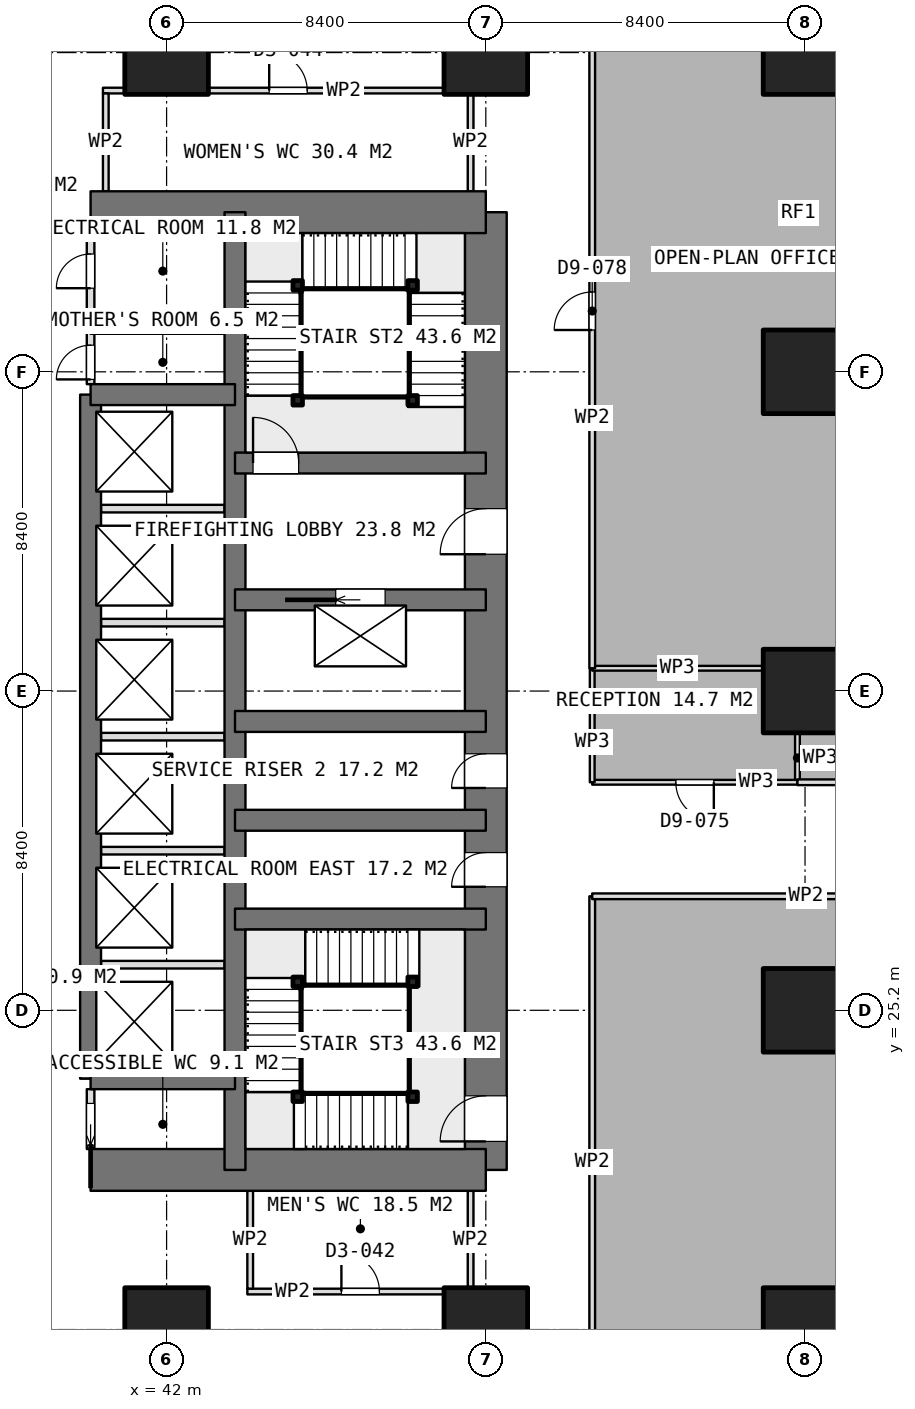
"""IFC4 building model, lengths in metres.
Left out: names, types, materials, properties, quantities, classifications, styles, units other than length and angle.
Written with IfcOpenShell. Run it as: python <this file> out.ifc"""

import sys

from ifc_helpers import new_model, si_unit, direction, frame, frame_2d, origin, origin_2d, place, context, subcontext, project, spatial, rectangle, extrude, element, fill, save


model = new_model("IFC4")
c1 = context("Model", 3, precision=1e-05, world=origin(), true_north=direction((0.0, 1.0)))
c2 = subcontext(c1, "Body", "Model", "MODEL_VIEW")
j1 = project(units=[si_unit("LENGTHUNIT", "METRE"), si_unit("PLANEANGLEUNIT", "RADIAN")], contexts=[c1])
p1 = place(None, origin())
s1 = spatial("IfcSite", under=j1, at=p1, CompositionType="ELEMENT")
p2 = place(p1, origin())
s2 = spatial("IfcBuilding", under=s1, at=p2, CompositionType="ELEMENT")
p3 = place(p2, frame((0.0, 0.0, 36.65)))
s3 = spatial("IfcBuildingStorey", under=s2, at=p3, CompositionType="ELEMENT", Elevation=36.65)
for number, where, z_axis, x_axis in (
    (1, (40.0, 21.0, 0.0), (0.0, 0.0, 1.0), (1.0, 0.0, 0.0)),
    (2, (40.0, 46.2, 0.0), (0.0, 0.0, 1.0), (1.0, 0.0, 0.0)),
):
    element("IfcWall", number, at=place(p3, frame(where, z_axis=z_axis, x_axis=x_axis)), inside=s3, PredefinedType="SHEAR", context=c2, shape_type="SweptSolid", body=[
        extrude(rectangle(XDim=10.4, YDim=1.1, at=frame_2d((5.2, 0.0))), origin(), (0.0, 0.0, 1.0), 3.75),
    ])
p4 = place(p3, frame((50.4, 21.0, 0.0), z_axis=(0.0, 0.0, 1.0), x_axis=(0.0, 1.0, 0.0)))
e3 = element("IfcWall", 3, at=p4, inside=s3, PredefinedType="SHEAR", context=c2, shape_type="SweptSolid", body=[
    extrude(rectangle(XDim=25.2, YDim=1.1, at=frame_2d((12.6, 0.0))), origin(), (0.0, 0.0, 1.0), 3.75),
])
p5 = place(p4, frame((16.2, 0.0, 0.0)))
e4 = element("IfcOpeningElement", 4, at=p5, cuts=e3, PredefinedType="OPENING", context=c2, shape_type="SweptSolid", body=[
    extrude(rectangle(XDim=1.2, YDim=2.1, at=frame_2d((0.6, 1.05))), frame((0.0, 0.56, 0.0), z_axis=(0.0, -1.0, 0.0), x_axis=(1.0, 0.0, 0.0)), (0.0, 0.0, 1.0), 1.12),
])
p6 = place(p4, frame((10.05, 0.0, 0.0)))
e5 = element("IfcOpeningElement", 5, at=p6, cuts=e3, PredefinedType="OPENING", context=c2, shape_type="SweptSolid", body=[
    extrude(rectangle(XDim=0.9, YDim=2.1, at=frame_2d((0.45, 1.05))), frame((0.0, 0.56, 0.0), z_axis=(0.0, -1.0, 0.0), x_axis=(1.0, 0.0, 0.0)), (0.0, 0.0, 1.0), 1.12),
])
p7 = place(p4, frame((7.45, 0.0, 0.0)))
e6 = element("IfcOpeningElement", 6, at=p7, cuts=e3, PredefinedType="OPENING", context=c2, shape_type="SweptSolid", body=[
    extrude(rectangle(XDim=0.9, YDim=2.1, at=frame_2d((0.45, 1.05))), frame((0.0, 0.56, 0.0), z_axis=(0.0, -1.0, 0.0), x_axis=(1.0, 0.0, 0.0)), (0.0, 0.0, 1.0), 1.12),
])
p8 = place(p4, frame((0.75, 0.0, 0.0)))
e7 = element("IfcOpeningElement", 7, at=p8, cuts=e3, PredefinedType="OPENING", context=c2, shape_type="SweptSolid", body=[
    extrude(rectangle(XDim=1.2, YDim=2.1, at=frame_2d((0.6, 1.05))), frame((0.0, 0.56, 0.0), z_axis=(0.0, -1.0, 0.0), x_axis=(1.0, 0.0, 0.0)), (0.0, 0.0, 1.0), 1.12),
])
p9 = place(p3, frame((43.8, 21.0, 0.0), z_axis=(0.0, 0.0, 1.0), x_axis=(0.0, 1.0, 0.0)))
e8 = element("IfcWall", 8, at=p9, inside=s3, PredefinedType="SHEAR", context=c2, shape_type="SweptSolid", body=[
    extrude(rectangle(XDim=25.2, YDim=0.55, at=frame_2d((12.6, 0.0))), origin(), (0.0, 0.0, 1.0), 3.75),
])
p10 = place(p3, frame((40.0, 23.4, 0.0), z_axis=(0.0, 0.0, 1.0), x_axis=(0.0, 1.0, 0.0)))
e9 = element("IfcWall", 9, at=p10, inside=s3, PredefinedType="SHEAR", context=c2, shape_type="SweptSolid", body=[
    extrude(rectangle(XDim=18.0, YDim=0.55, at=frame_2d((9.0, 0.0))), origin(), (0.0, 0.0, 1.0), 3.75),
])
for number, where, z_axis, x_axis in (
    (10, (40.0, 23.4, 0.0), (0.0, 0.0, 1.0), (1.0, 0.0, 0.0)),
    (11, (40.0, 41.4, 0.0), (0.0, 0.0, 1.0), (1.0, 0.0, 0.0)),
):
    element("IfcWall", number, at=place(p3, frame(where, z_axis=z_axis, x_axis=x_axis)), inside=s3, PredefinedType="SHEAR", context=c2, shape_type="SweptSolid", body=[
        extrude(rectangle(XDim=3.8, YDim=0.55, at=frame_2d((1.9, 0.0))), origin(), (0.0, 0.0, 1.0), 3.75),
    ])
for number, where, z_axis, x_axis in (
    (12, (43.8, 27.6, 0.0), (0.0, 0.0, 1.0), (1.0, 0.0, 0.0)),
    (13, (43.8, 30.2, 0.0), (0.0, 0.0, 1.0), (1.0, 0.0, 0.0)),
    (14, (43.8, 32.8, 0.0), (0.0, 0.0, 1.0), (1.0, 0.0, 0.0)),
):
    element("IfcWall", number, at=place(p3, frame(where, z_axis=z_axis, x_axis=x_axis)), inside=s3, PredefinedType="SHEAR", context=c2, shape_type="SweptSolid", body=[
        extrude(rectangle(XDim=6.6, YDim=0.55, at=frame_2d((3.3, 0.0))), origin(), (0.0, 0.0, 1.0), 3.75),
    ])
p11 = place(p3, frame((43.8, 36.0, 0.0), z_axis=(0.0, 0.0, 1.0), x_axis=(1.0, 0.0, 0.0)))
e15 = element("IfcWall", 15, at=p11, inside=s3, PredefinedType="SHEAR", context=c2, shape_type="SweptSolid", body=[
    extrude(rectangle(XDim=6.6, YDim=0.55, at=frame_2d((3.3, 0.0))), origin(), (0.0, 0.0, 1.0), 3.75),
])
p12 = place(p11, frame((2.65, 0.0, 0.0)))
e16 = element("IfcOpeningElement", 16, at=p12, cuts=e15, PredefinedType="OPENING", context=c2, shape_type="SweptSolid", body=[
    extrude(rectangle(XDim=1.3, YDim=2.1, at=frame_2d((0.65, 1.05))), frame((0.0, 0.285, 0.0), z_axis=(0.0, -1.0, 0.0), x_axis=(1.0, 0.0, 0.0)), (0.0, 0.0, 1.0), 0.57),
])
p13 = place(p3, frame((43.8, 39.6, 0.0), z_axis=(0.0, 0.0, 1.0), x_axis=(1.0, 0.0, 0.0)))
e17 = element("IfcWall", 17, at=p13, inside=s3, PredefinedType="SHEAR", context=c2, shape_type="SweptSolid", body=[
    extrude(rectangle(XDim=6.6, YDim=0.55, at=frame_2d((3.3, 0.0))), origin(), (0.0, 0.0, 1.0), 3.75),
])
p14 = place(p13, frame((0.475, 0.0, 0.0)))
e18 = element("IfcOpeningElement", 18, at=p14, cuts=e17, PredefinedType="OPENING", context=c2, shape_type="SweptSolid", body=[
    extrude(rectangle(XDim=1.2, YDim=2.1, at=frame_2d((0.6, 1.05))), frame((0.0, 0.285, 0.0), z_axis=(0.0, -1.0, 0.0), x_axis=(1.0, 0.0, 0.0)), (0.0, 0.0, 1.0), 0.57),
])
for number, where, z_axis, x_axis in (
    (19, (42.0, 16.8, 0.0), (0.0, 0.0, 1.0), (1.0, 0.0, 0.0)),
    (20, (42.0, 50.4, 0.0), (0.0, 0.0, 1.0), (1.0, 0.0, 0.0)),
    (21, (50.4, 16.8, 0.0), (0.0, 0.0, 1.0), (1.0, 0.0, 0.0)),
    (22, (50.4, 50.4, 0.0), (0.0, 0.0, 1.0), (1.0, 0.0, 0.0)),
    (23, (58.8, 16.8, 0.0), (0.0, 0.0, 1.0), (1.0, 0.0, 0.0)),
    (24, (58.8, 25.2, 0.0), (0.0, 0.0, 1.0), (1.0, 0.0, 0.0)),
    (25, (58.8, 33.6, 0.0), (0.0, 0.0, 1.0), (1.0, 0.0, 0.0)),
    (26, (58.8, 42.0, 0.0), (0.0, 0.0, 1.0), (1.0, 0.0, 0.0)),
    (27, (58.8, 50.4, 0.0), (0.0, 0.0, 1.0), (1.0, 0.0, 0.0)),
):
    element("IfcColumn", number, at=place(p3, frame(where, z_axis=z_axis, x_axis=x_axis)), inside=s3, PredefinedType="COLUMN", context=c2, shape_type="SweptSolid", body=[
        extrude(rectangle(XDim=2.2, YDim=2.2, at=origin_2d()), origin(), (0.0, 0.0, 1.0), 3.75),
    ])
for number, where, z_axis, x_axis in (
    (28, (40.275, 26.4, 0.0), (0.0, 0.0, 1.0), (1.0, 0.0, 0.0)),
    (29, (40.275, 29.4, 0.0), (0.0, 0.0, 1.0), (1.0, 0.0, 0.0)),
    (30, (40.275, 32.4, 0.0), (0.0, 0.0, 1.0), (1.0, 0.0, 0.0)),
    (31, (40.275, 35.4, 0.0), (0.0, 0.0, 1.0), (1.0, 0.0, 0.0)),
    (32, (40.275, 38.4, 0.0), (0.0, 0.0, 1.0), (1.0, 0.0, 0.0)),
):
    element("IfcWall", number, at=place(p3, frame(where, z_axis=z_axis, x_axis=x_axis)), inside=s3, PredefinedType="PARTITIONING", context=c2, shape_type="SweptSolid", body=[
        extrude(rectangle(XDim=3.25, YDim=0.2, at=frame_2d((1.625, 0.0))), origin(), (0.0, 0.0, 1.0), 3.5),
    ])
p15 = place(p3, frame((40.0, 21.55, 0.0), z_axis=(0.0, 0.0, 1.0), x_axis=(0.0, 1.0, 0.0)))
e33 = element("IfcWall", 33, at=p15, inside=s3, PredefinedType="PARTITIONING", context=c2, shape_type="SweptSolid", body=[
    extrude(rectangle(XDim=1.575, YDim=0.2, at=frame_2d((0.788, 0.0))), origin(), (0.0, 0.0, 1.0), 3.5),
])
p16 = place(p15, frame((0.1, 0.0, 0.0)))
e34 = element("IfcOpeningElement", 34, at=p16, cuts=e33, PredefinedType="OPENING", context=c2, shape_type="SweptSolid", body=[
    extrude(rectangle(XDim=1.1, YDim=2.1, at=frame_2d((0.55, 1.05))), frame((0.0, 0.11, 0.0), z_axis=(0.0, -1.0, 0.0), x_axis=(1.0, 0.0, 0.0)), (0.0, 0.0, 1.0), 0.22),
])
p17 = place(p3, frame((40.0, 41.675, 0.0), z_axis=(0.0, 0.0, 1.0), x_axis=(0.0, 1.0, 0.0)))
e35 = element("IfcWall", 35, at=p17, inside=s3, PredefinedType="PARTITIONING", context=c2, shape_type="SweptSolid", body=[
    extrude(rectangle(XDim=3.975, YDim=0.2, at=frame_2d((1.987, 0.0))), origin(), (0.0, 0.0, 1.0), 3.5),
])
p18 = place(p17, frame((2.525, 0.0, 0.0)))
e36 = element("IfcOpeningElement", 36, at=p18, cuts=e35, PredefinedType="OPENING", context=c2, shape_type="SweptSolid", body=[
    extrude(rectangle(XDim=0.9, YDim=2.1, at=frame_2d((0.45, 1.05))), frame((0.0, 0.11, 0.0), z_axis=(0.0, -1.0, 0.0), x_axis=(1.0, 0.0, 0.0)), (0.0, 0.0, 1.0), 0.22),
])
p19 = place(p17, frame((0.125, 0.0, 0.0)))
e37 = element("IfcOpeningElement", 37, at=p19, cuts=e35, PredefinedType="OPENING", context=c2, shape_type="SweptSolid", body=[
    extrude(rectangle(XDim=0.9, YDim=2.1, at=frame_2d((0.45, 1.05))), frame((0.0, 0.11, 0.0), z_axis=(0.0, -1.0, 0.0), x_axis=(1.0, 0.0, 0.0)), (0.0, 0.0, 1.0), 0.22),
])
p20 = place(p3, frame((40.0, 43.1, 0.0), z_axis=(0.0, 0.0, 1.0), x_axis=(1.0, 0.0, 0.0)))
e38 = element("IfcWall", 38, at=p20, inside=s3, PredefinedType="PARTITIONING", context=c2, shape_type="SweptSolid", body=[
    extrude(rectangle(XDim=3.525, YDim=0.2, at=frame_2d((1.762, 0.0))), origin(), (0.0, 0.0, 1.0), 3.5),
])
p21 = place(p3, frame((40.325, 49.4, 0.0), z_axis=(0.0, 0.0, 1.0), x_axis=(1.0, 0.0, 0.0)))
e39 = element("IfcWall", 39, at=p21, inside=s3, PredefinedType="PARTITIONING", context=c2, shape_type="SweptSolid", body=[
    extrude(rectangle(XDim=9.75, YDim=0.15, at=frame_2d((4.875, 0.0))), origin(), (0.0, 0.0, 1.0), 3.5),
])
p22 = place(p21, frame((4.375, 0.0, 0.0)))
e40 = element("IfcOpeningElement", 40, at=p22, cuts=e39, PredefinedType="OPENING", context=c2, shape_type="SweptSolid", body=[
    extrude(rectangle(XDim=1.0, YDim=2.1, at=frame_2d((0.5, 1.05))), frame((0.0, 0.085, 0.0), z_axis=(0.0, -1.0, 0.0), x_axis=(1.0, 0.0, 0.0)), (0.0, 0.0, 1.0), 0.17),
])
for number, where, z_axis, x_axis in (
    (41, (40.4, 46.75, 0.0), (0.0, 0.0, 1.0), (0.0, 1.0, 0.0)),
    (42, (50.0, 46.75, 0.0), (0.0, 0.0, 1.0), (0.0, 1.0, 0.0)),
):
    element("IfcWall", number, at=place(p3, frame(where, z_axis=z_axis, x_axis=x_axis)), inside=s3, PredefinedType="PARTITIONING", context=c2, shape_type="SweptSolid", body=[
        extrude(rectangle(XDim=2.575, YDim=0.15, at=frame_2d((1.288, 0.0))), origin(), (0.0, 0.0, 1.0), 3.5),
    ])
p23 = place(p3, frame((44.125, 17.8, 0.0), z_axis=(0.0, 0.0, 1.0), x_axis=(1.0, 0.0, 0.0)))
e43 = element("IfcWall", 43, at=p23, inside=s3, PredefinedType="PARTITIONING", context=c2, shape_type="SweptSolid", body=[
    extrude(rectangle(XDim=5.95, YDim=0.15, at=frame_2d((2.975, 0.0))), origin(), (0.0, 0.0, 1.0), 3.5),
])
p24 = place(p23, frame((2.475, 0.0, 0.0)))
e44 = element("IfcOpeningElement", 44, at=p24, cuts=e43, PredefinedType="OPENING", context=c2, shape_type="SweptSolid", body=[
    extrude(rectangle(XDim=1.0, YDim=2.1, at=frame_2d((0.5, 1.05))), frame((0.0, 0.085, 0.0), z_axis=(0.0, -1.0, 0.0), x_axis=(1.0, 0.0, 0.0)), (0.0, 0.0, 1.0), 0.17),
])
for number, where, z_axis, x_axis in (
    (45, (44.2, 17.875, 0.0), (0.0, 0.0, 1.0), (0.0, 1.0, 0.0)),
    (46, (50.0, 17.875, 0.0), (0.0, 0.0, 1.0), (0.0, 1.0, 0.0)),
):
    element("IfcWall", number, at=place(p3, frame(where, z_axis=z_axis, x_axis=x_axis)), inside=s3, PredefinedType="PARTITIONING", context=c2, shape_type="SweptSolid", body=[
        extrude(rectangle(XDim=2.575, YDim=0.15, at=frame_2d((1.288, 0.0))), origin(), (0.0, 0.0, 1.0), 3.5),
    ])
p25 = place(p3, frame((53.2, 14.2, 0.0), z_axis=(0.0, 0.0, 1.0), x_axis=(0.0, 1.0, 0.0)))
e47 = element("IfcWall", 47, at=p25, inside=s3, PredefinedType="PARTITIONING", context=c2, shape_type="SweptSolid", body=[
    extrude(rectangle(XDim=14.0, YDim=0.15, at=frame_2d((7.0, 0.0))), origin(), (0.0, 0.0, 1.0), 3.5),
])
p26 = place(p3, frame((53.2, 28.2, 0.0), z_axis=(0.0, 0.0, 1.0), x_axis=(1.0, 0.0, 0.0)))
e48 = element("IfcWall", 48, at=p26, inside=s3, PredefinedType="PARTITIONING", context=c2, shape_type="SweptSolid", body=[
    extrude(rectangle(XDim=16.074, YDim=0.15, at=frame_2d((8.037, 0.0))), origin(), (0.0, 0.0, 1.0), 3.5),
])
p27 = place(p26, frame((7.522, 0.0, 0.0)))
e49 = element("IfcOpeningElement", 49, at=p27, cuts=e48, PredefinedType="OPENING", context=c2, shape_type="SweptSolid", body=[
    extrude(rectangle(XDim=1.0, YDim=2.1, at=frame_2d((0.5, 1.05))), frame((0.0, 0.085, 0.0), z_axis=(0.0, -1.0, 0.0), x_axis=(1.0, 0.0, 0.0)), (0.0, 0.0, 1.0), 0.17),
])
p28 = place(p3, frame((58.6, 32.48, 0.0), z_axis=(0.0, 0.0, 1.0), x_axis=(0.0, -1.0, 0.0)))
e50 = element("IfcWall", 50, at=p28, inside=s3, PredefinedType="PARTITIONING", context=c2, shape_type="SweptSolid", body=[
    extrude(rectangle(XDim=1.28, YDim=0.125, at=frame_2d((0.64, 0.0))), origin(), (0.0, 0.0, 1.0), 3.5),
])
p29 = place(p3, frame((58.6, 31.2, 0.0), z_axis=(0.0, 0.0, 1.0), x_axis=(-1.0, 0.0, 0.0)))
e51 = element("IfcWall", 51, at=p29, inside=s3, PredefinedType="PARTITIONING", context=c2, shape_type="SweptSolid", body=[
    extrude(rectangle(XDim=5.4, YDim=0.125, at=frame_2d((2.7, 0.0))), origin(), (0.0, 0.0, 1.0), 3.5),
])
p30 = place(p29, frame((2.2, 0.0, 0.0)))
e52 = element("IfcOpeningElement", 52, at=p30, cuts=e51, PredefinedType="OPENING", context=c2, shape_type="SweptSolid", body=[
    extrude(rectangle(XDim=1.0, YDim=2.1, at=frame_2d((0.5, 1.05))), frame((0.0, 0.073, 0.0), z_axis=(0.0, -1.0, 0.0), x_axis=(1.0, 0.0, 0.0)), (0.0, 0.0, 1.0), 0.145),
])
p31 = place(p3, frame((53.2, 31.2, 0.0), z_axis=(0.0, 0.0, 1.0), x_axis=(0.0, 1.0, 0.0)))
e53 = element("IfcWall", 53, at=p31, inside=s3, PredefinedType="PARTITIONING", context=c2, shape_type="SweptSolid", body=[
    extrude(rectangle(XDim=3.0, YDim=0.125, at=frame_2d((1.5, 0.0))), origin(), (0.0, 0.0, 1.0), 3.5),
])
p32 = place(p3, frame((53.2, 34.2, 0.0), z_axis=(0.0, 0.0, 1.0), x_axis=(1.0, 0.0, 0.0)))
e54 = element("IfcWall", 54, at=p32, inside=s3, PredefinedType="PARTITIONING", context=c2, shape_type="SweptSolid", body=[
    extrude(rectangle(XDim=4.48, YDim=0.125, at=frame_2d((2.24, 0.0))), origin(), (0.0, 0.0, 1.0), 3.5),
])
p33 = place(p3, frame((64.691, 31.2, 0.0), z_axis=(0.0, 0.0, 1.0), x_axis=(-1.0, 0.0, 0.0)))
e55 = element("IfcWall", 55, at=p33, inside=s3, PredefinedType="PARTITIONING", context=c2, shape_type="SweptSolid", body=[
    extrude(rectangle(XDim=6.091, YDim=0.15, at=frame_2d((3.045, 0.0))), origin(), (0.0, 0.0, 1.0), 3.5),
])
p34 = place(p3, frame((53.2, 34.2, 0.0), z_axis=(0.0, 0.0, 1.0), x_axis=(0.0, 1.0, 0.0)))
e56 = element("IfcWall", 56, at=p34, inside=s3, PredefinedType="PARTITIONING", context=c2, shape_type="SweptSolid", body=[
    extrude(rectangle(XDim=18.8, YDim=0.15, at=frame_2d((9.4, 0.0))), origin(), (0.0, 0.0, 1.0), 3.5),
])
p35 = place(p34, frame((8.9, 0.0, 0.0)))
e57 = element("IfcOpeningElement", 57, at=p35, cuts=e56, PredefinedType="OPENING", context=c2, shape_type="SweptSolid", body=[
    extrude(rectangle(XDim=1.0, YDim=2.1, at=frame_2d((0.5, 1.05))), frame((0.0, 0.085, 0.0), z_axis=(0.0, -1.0, 0.0), x_axis=(1.0, 0.0, 0.0)), (0.0, 0.0, 1.0), 0.17),
])
for number, where, z_axis, x_axis in (
    (58, (45.45, 41.25, 0.0), (0.0, 0.0, 1.0), (1.0, 0.0, 0.0)),
    (59, (45.45, 44.275, 0.0), (0.0, 0.0, 1.0), (1.0, 0.0, 0.0)),
    (60, (48.475, 44.275, 0.0), (0.0, 0.0, 1.0), (1.0, 0.0, 0.0)),
    (61, (48.475, 41.25, 0.0), (0.0, 0.0, 1.0), (1.0, 0.0, 0.0)),
    (62, (48.475, 22.925, 0.0), (0.0, 0.0, 1.0), (1.0, 0.0, 0.0)),
    (63, (45.45, 22.925, 0.0), (0.0, 0.0, 1.0), (1.0, 0.0, 0.0)),
    (64, (45.45, 25.95, 0.0), (0.0, 0.0, 1.0), (1.0, 0.0, 0.0)),
    (65, (48.475, 25.95, 0.0), (0.0, 0.0, 1.0), (1.0, 0.0, 0.0)),
):
    element("IfcColumn", number, at=place(p3, frame(where, z_axis=z_axis, x_axis=x_axis)), inside=s3, PredefinedType="COLUMN", context=c2, shape_type="SweptSolid", body=[
        extrude(rectangle(XDim=0.25, YDim=0.25, at=origin_2d()), origin(), (0.0, 0.0, 1.0), 3.75),
    ])
p36 = place(p5, origin())
e66 = element("IfcDoor", 66, at=p36, inside=s3, OperationType="SINGLE_SWING_LEFT", PredefinedType="DOOR", context=c2, shape_type="SweptSolid", body=[
    extrude(rectangle(XDim=1.2, YDim=2.1, at=frame_2d((0.6, 1.05))), frame((0.0, 0.025, 0.0), z_axis=(0.0, -1.0, 0.0), x_axis=(1.0, 0.0, 0.0)), (0.0, 0.0, 1.0), 0.05),
])
fill(e4, e66)
p37 = place(p6, origin())
e67 = element("IfcDoor", 67, at=p37, inside=s3, OperationType="SINGLE_SWING_LEFT", PredefinedType="DOOR", context=c2, shape_type="SweptSolid", body=[
    extrude(rectangle(XDim=0.9, YDim=2.1, at=frame_2d((0.45, 1.05))), frame((0.0, 0.025, 0.0), z_axis=(0.0, -1.0, 0.0), x_axis=(1.0, 0.0, 0.0)), (0.0, 0.0, 1.0), 0.05),
])
fill(e5, e67)
p38 = place(p7, origin())
e68 = element("IfcDoor", 68, at=p38, inside=s3, OperationType="SINGLE_SWING_LEFT", PredefinedType="DOOR", context=c2, shape_type="SweptSolid", body=[
    extrude(rectangle(XDim=0.9, YDim=2.1, at=frame_2d((0.45, 1.05))), frame((0.0, 0.025, 0.0), z_axis=(0.0, -1.0, 0.0), x_axis=(1.0, 0.0, 0.0)), (0.0, 0.0, 1.0), 0.05),
])
fill(e6, e68)
p39 = place(p16, origin())
e69 = element("IfcDoor", 69, at=p39, inside=s3, OperationType="SLIDING_TO_LEFT", PredefinedType="DOOR", context=c2, shape_type="SweptSolid", body=[
    extrude(rectangle(XDim=1.1, YDim=2.1, at=frame_2d((0.55, 1.05))), frame((0.0, 0.025, 0.0), z_axis=(0.0, -1.0, 0.0), x_axis=(1.0, 0.0, 0.0)), (0.0, 0.0, 1.0), 0.05),
])
fill(e34, e69)
p40 = place(p18, origin())
e70 = element("IfcDoor", 70, at=p40, inside=s3, OperationType="SINGLE_SWING_LEFT", PredefinedType="DOOR", context=c2, shape_type="SweptSolid", body=[
    extrude(rectangle(XDim=0.9, YDim=2.1, at=frame_2d((0.45, 1.05))), frame((0.0, 0.025, 0.0), z_axis=(0.0, -1.0, 0.0), x_axis=(1.0, 0.0, 0.0)), (0.0, 0.0, 1.0), 0.05),
])
fill(e36, e70)
p41 = place(p19, origin())
e71 = element("IfcDoor", 71, at=p41, inside=s3, OperationType="SINGLE_SWING_LEFT", PredefinedType="DOOR", context=c2, shape_type="SweptSolid", body=[
    extrude(rectangle(XDim=0.9, YDim=2.1, at=frame_2d((0.45, 1.05))), frame((0.0, 0.025, 0.0), z_axis=(0.0, -1.0, 0.0), x_axis=(1.0, 0.0, 0.0)), (0.0, 0.0, 1.0), 0.05),
])
fill(e37, e71)
p42 = place(p12, origin())
e72 = element("IfcDoor", 72, at=p42, inside=s3, OperationType="SLIDING_TO_LEFT", PredefinedType="USERDEFINED", context=c2, shape_type="SweptSolid", body=[
    extrude(rectangle(XDim=1.3, YDim=2.1, at=frame_2d((0.65, 1.05))), frame((0.0, 0.025, 0.0), z_axis=(0.0, -1.0, 0.0), x_axis=(1.0, 0.0, 0.0)), (0.0, 0.0, 1.0), 0.05),
])
fill(e16, e72)
p43 = place(p22, origin())
e73 = element("IfcDoor", 73, at=p43, inside=s3, OperationType="SINGLE_SWING_LEFT", PredefinedType="DOOR", context=c2, shape_type="SweptSolid", body=[
    extrude(rectangle(XDim=1.0, YDim=2.1, at=frame_2d((0.5, 1.05))), frame((0.0, 0.025, 0.0), z_axis=(0.0, -1.0, 0.0), x_axis=(1.0, 0.0, 0.0)), (0.0, 0.0, 1.0), 0.05),
])
fill(e40, e73)
p44 = place(p24, origin())
e74 = element("IfcDoor", 74, at=p44, inside=s3, OperationType="SINGLE_SWING_LEFT", PredefinedType="DOOR", context=c2, shape_type="SweptSolid", body=[
    extrude(rectangle(XDim=1.0, YDim=2.1, at=frame_2d((0.5, 1.05))), frame((0.0, 0.025, 0.0), z_axis=(0.0, -1.0, 0.0), x_axis=(1.0, 0.0, 0.0)), (0.0, 0.0, 1.0), 0.05),
])
fill(e44, e74)
p45 = place(p30, origin())
e75 = element("IfcDoor", 75, at=p45, inside=s3, OperationType="SINGLE_SWING_LEFT", PredefinedType="DOOR", context=c2, shape_type="SweptSolid", body=[
    extrude(rectangle(XDim=1.0, YDim=2.1, at=frame_2d((0.5, 1.05))), frame((0.0, 0.025, 0.0), z_axis=(0.0, -1.0, 0.0), x_axis=(1.0, 0.0, 0.0)), (0.0, 0.0, 1.0), 0.05),
])
fill(e52, e75)
p46 = place(p35, origin())
e76 = element("IfcDoor", 76, at=p46, inside=s3, OperationType="SINGLE_SWING_LEFT", PredefinedType="DOOR", context=c2, shape_type="SweptSolid", body=[
    extrude(rectangle(XDim=1.0, YDim=2.1, at=frame_2d((0.5, 1.05))), frame((0.0, 0.025, 0.0), z_axis=(0.0, -1.0, 0.0), x_axis=(1.0, 0.0, 0.0)), (0.0, 0.0, 1.0), 0.05),
])
fill(e57, e76)
p47 = place(p14, origin())
e77 = element("IfcDoor", 77, at=p47, inside=s3, OperationType="SINGLE_SWING_RIGHT", PredefinedType="DOOR", context=c2, shape_type="SweptSolid", body=[
    extrude(rectangle(XDim=1.2, YDim=2.1, at=frame_2d((0.6, 1.05))), frame((0.0, 0.025, 0.0), z_axis=(0.0, -1.0, 0.0), x_axis=(1.0, 0.0, 0.0)), (0.0, 0.0, 1.0), 0.05),
])
fill(e18, e77)
p48 = place(p8, origin())
e78 = element("IfcDoor", 78, at=p48, inside=s3, OperationType="SINGLE_SWING_RIGHT", PredefinedType="DOOR", context=c2, shape_type="SweptSolid", body=[
    extrude(rectangle(XDim=1.2, YDim=2.1, at=frame_2d((0.6, 1.05))), frame((0.0, 0.025, 0.0), z_axis=(0.0, -1.0, 0.0), x_axis=(1.0, 0.0, 0.0)), (0.0, 0.0, 1.0), 0.05),
])
fill(e7, e78)
save(model, sys.argv[1])
